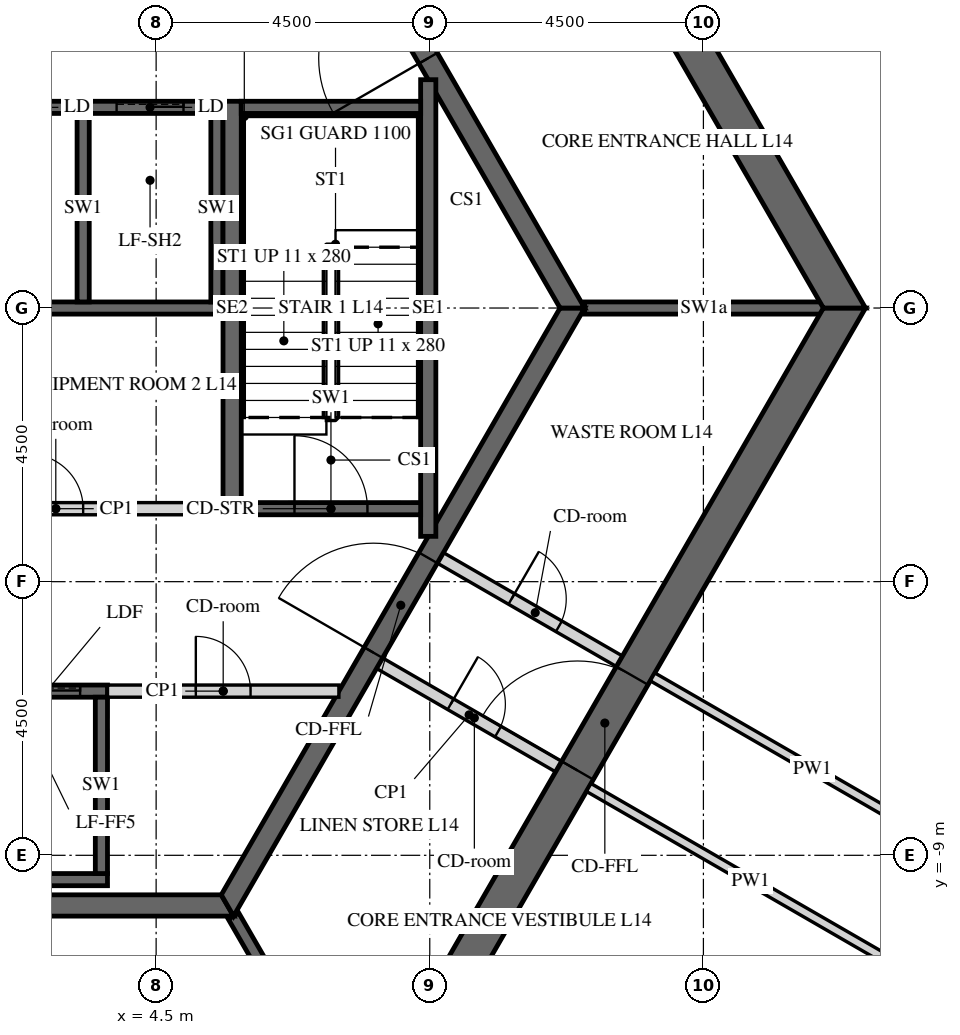
"""IFC4 building model, lengths in metres.
Left out: names, types, materials, properties, quantities, classifications, styles, units other than length and angle.
Written with IfcOpenShell. Run it as: python <this file> out.ifc"""

import sys

from ifc_helpers import new_model, si_unit, direction, frame, frame_2d, origin, place, context, subcontext, project, spatial, polyline, rectangle, outline, extrude, element, fill, save


model = new_model("IFC4")
c1 = context("Model", 3, precision=1e-05, world=origin(), true_north=direction((0.0, 1.0)))
c2 = subcontext(c1, "Body", "Model", "MODEL_VIEW")
j1 = project(units=[si_unit("LENGTHUNIT", "METRE"), si_unit("PLANEANGLEUNIT", "RADIAN")], contexts=[c1])
p1 = place(None, origin())
s1 = spatial("IfcSite", under=j1, at=p1, CompositionType="ELEMENT")
p2 = place(p1, origin())
s2 = spatial("IfcBuilding", under=s1, at=p2, CompositionType="ELEMENT")
p3 = place(p2, frame((0.0, 0.0, 68.7)))
s3 = spatial("IfcBuildingStorey", under=s2, at=p3, CompositionType="ELEMENT", Elevation=68.7)
p4 = place(p3, frame((7.91, -13.7, -0.15), z_axis=(0.0, 0.0, 1.0), x_axis=(0.499999880136, 0.866025472988, 0.0)))
e1 = element("IfcWall", 1, at=p4, inside=s3, PredefinedType="SHEAR", context=c2, shape_type="SweptSolid", body=[
    extrude(outline(polyline([(-0.173, -0.3), (15.993, -0.3), (15.646, 0.3), (0.173, 0.3), (-0.173, -0.3)])), origin(), (0.0, 0.0, 1.0), 3.9),
])
p5 = place(p4, frame((7.039, 0.0, 0.15)))
e2 = element("IfcOpeningElement", 2, at=p5, cuts=e1, PredefinedType="OPENING", context=c2, shape_type="SweptSolid", body=[
    extrude(rectangle(XDim=1.8, YDim=2.4, at=frame_2d((0.9, 1.2))), frame((0.0, 0.31, 0.0), z_axis=(0.0, -1.0, 0.0), x_axis=(1.0, 0.0, 0.0)), (0.0, 0.0, 1.0), 0.62),
])
p6 = place(p3, frame((15.819, 0.0, -0.15), z_axis=(0.0, 0.0, 1.0), x_axis=(-0.499999880136, 0.866025472988, 0.0)))
e3 = element("IfcWall", 3, at=p6, inside=s3, PredefinedType="SHEAR", context=c2, shape_type="SweptSolid", body=[
    extrude(outline(polyline([(-0.173, -0.3), (15.993, -0.3), (15.646, 0.3), (0.173, 0.3), (-0.173, -0.3)])), origin(), (0.0, 0.0, 1.0), 3.9),
])
p7 = place(p6, frame((6.981, 0.0, 0.15)))
e4 = element("IfcOpeningElement", 4, at=p7, cuts=e3, PredefinedType="OPENING", context=c2, shape_type="SweptSolid", body=[
    extrude(rectangle(XDim=1.8, YDim=2.4, at=frame_2d((0.9, 1.2))), frame((0.0, 0.31, 0.0), z_axis=(0.0, -1.0, 0.0), x_axis=(1.0, 0.0, 0.0)), (0.0, 0.0, 1.0), 0.62),
])
p8 = place(p3, frame((-5.673, -9.825, -0.15), z_axis=(0.0, 0.0, 1.0), x_axis=(1.0, 0.0, 0.0)))
e5 = element("IfcWall", 5, at=p8, inside=s3, PredefinedType="SHEAR", context=c2, shape_type="SweptSolid", body=[
    extrude(outline(polyline([(-0.101, -0.175), (11.446, -0.175), (11.244, 0.175), (0.101, 0.175), (-0.101, -0.175)])), origin(), (0.0, 0.0, 1.0), 3.9),
])
p9 = place(p3, frame((5.673, -9.825, -0.15), z_axis=(0.0, 0.0, 1.0), x_axis=(0.499995046907, 0.866028263435, 0.0)))
e6 = element("IfcWall", 6, at=p9, inside=s3, PredefinedType="SHEAR", context=c2, shape_type="SweptSolid", body=[
    extrude(outline(polyline([(-0.101, -0.175), (11.446, -0.175), (11.244, 0.175), (0.101, 0.175), (-0.101, -0.175)])), origin(), (0.0, 0.0, 1.0), 3.9),
])
p10 = place(p9, frame((4.801, 0.0, 0.15)))
e7 = element("IfcOpeningElement", 7, at=p10, cuts=e6, PredefinedType="OPENING", context=c2, shape_type="SweptSolid", body=[
    extrude(rectangle(XDim=1.8, YDim=2.4, at=frame_2d((0.9, 1.2))), frame((0.0, 0.185, 0.0), z_axis=(0.0, -1.0, 0.0), x_axis=(1.0, 0.0, 0.0)), (0.0, 0.0, 1.0), 0.37),
])
p11 = place(p3, frame((11.345, 0.0, -0.15), z_axis=(0.0, 0.0, 1.0), x_axis=(-0.499995046907, 0.866028263435, 0.0)))
e8 = element("IfcWall", 8, at=p11, inside=s3, PredefinedType="SHEAR", context=c2, shape_type="SweptSolid", body=[
    extrude(outline(polyline([(-0.101, -0.175), (11.446, -0.175), (11.244, 0.175), (0.101, 0.175), (-0.101, -0.175)])), origin(), (0.0, 0.0, 1.0), 3.9),
])
p12 = place(p11, frame((4.744, 0.0, 0.15)))
e9 = element("IfcOpeningElement", 9, at=p12, cuts=e8, PredefinedType="OPENING", context=c2, shape_type="SweptSolid", body=[
    extrude(rectangle(XDim=1.8, YDim=2.4, at=frame_2d((0.9, 1.2))), frame((0.0, 0.185, 0.0), z_axis=(0.0, -1.0, 0.0), x_axis=(1.0, 0.0, 0.0)), (0.0, 0.0, 1.0), 0.37),
])
p13 = place(p3, frame((-5.6, 3.3, -0.25), z_axis=(0.0, 0.0, 1.0), x_axis=(1.0, 0.0, 0.0)))
e10 = element("IfcWall", 10, at=p13, inside=s3, PredefinedType="SHEAR", context=c2, shape_type="SweptSolid", body=[
    extrude(rectangle(XDim=11.2, YDim=0.2, at=frame_2d((5.6, 0.0))), origin(), (0.0, 0.0, 1.0), 3.9),
])
p14 = place(p13, frame((0.65, 0.0, 0.25)))
e11 = element("IfcOpeningElement", 11, at=p14, cuts=e10, PredefinedType="OPENING", context=c2, shape_type="SweptSolid", body=[
    extrude(rectangle(XDim=1.1, YDim=2.1, at=frame_2d((0.55, 1.05))), frame((0.0, 0.11, 0.0), z_axis=(0.0, -1.0, 0.0), x_axis=(1.0, 0.0, 0.0)), (0.0, 0.0, 1.0), 0.22),
])
p15 = place(p13, frame((2.85, 0.0, 0.25)))
e12 = element("IfcOpeningElement", 12, at=p15, cuts=e10, PredefinedType="OPENING", context=c2, shape_type="SweptSolid", body=[
    extrude(rectangle(XDim=1.1, YDim=2.1, at=frame_2d((0.55, 1.05))), frame((0.0, 0.11, 0.0), z_axis=(0.0, -1.0, 0.0), x_axis=(1.0, 0.0, 0.0)), (0.0, 0.0, 1.0), 0.22),
])
p16 = place(p13, frame((5.05, 0.0, 0.25)))
e13 = element("IfcOpeningElement", 13, at=p16, cuts=e10, PredefinedType="OPENING", context=c2, shape_type="SweptSolid", body=[
    extrude(rectangle(XDim=1.1, YDim=2.1, at=frame_2d((0.55, 1.05))), frame((0.0, 0.11, 0.0), z_axis=(0.0, -1.0, 0.0), x_axis=(1.0, 0.0, 0.0)), (0.0, 0.0, 1.0), 0.22),
])
p17 = place(p13, frame((7.25, 0.0, 0.25)))
e14 = element("IfcOpeningElement", 14, at=p17, cuts=e10, PredefinedType="OPENING", context=c2, shape_type="SweptSolid", body=[
    extrude(rectangle(XDim=1.1, YDim=2.1, at=frame_2d((0.55, 1.05))), frame((0.0, 0.11, 0.0), z_axis=(0.0, -1.0, 0.0), x_axis=(1.0, 0.0, 0.0)), (0.0, 0.0, 1.0), 0.22),
])
p18 = place(p13, frame((9.45, 0.0, 0.25)))
e15 = element("IfcOpeningElement", 15, at=p18, cuts=e10, PredefinedType="OPENING", context=c2, shape_type="SweptSolid", body=[
    extrude(rectangle(XDim=1.1, YDim=2.1, at=frame_2d((0.55, 1.05))), frame((0.0, 0.11, 0.0), z_axis=(0.0, -1.0, 0.0), x_axis=(1.0, 0.0, 0.0)), (0.0, 0.0, 1.0), 0.22),
])
p19 = place(p3, frame((-5.6, 0.0, -0.25), z_axis=(0.0, 0.0, 1.0), x_axis=(1.0, 0.0, 0.0)))
e16 = element("IfcWall", 16, at=p19, inside=s3, PredefinedType="SHEAR", context=c2, shape_type="SweptSolid", body=[
    extrude(rectangle(XDim=11.2, YDim=0.2, at=frame_2d((5.6, 0.0))), origin(), (0.0, 0.0, 1.0), 3.9),
])
for number, where, z_axis, x_axis in (
    (17, (3.3, 0.1, -0.25), (0.0, 0.0, 1.0), (0.0, 1.0, 0.0)),
    (18, (5.5, 0.1, -0.25), (0.0, 0.0, 1.0), (0.0, 1.0, 0.0)),
):
    element("IfcWall", number, at=place(p3, frame(where, z_axis=z_axis, x_axis=x_axis)), inside=s3, PredefinedType="SHEAR", context=c2, shape_type="SweptSolid", body=[
        extrude(rectangle(XDim=3.1, YDim=0.2, at=frame_2d((1.55, 0.0))), origin(), (0.0, 0.0, 1.0), 3.9),
    ])
p20 = place(p3, frame((-5.5, -6.3, -0.25), z_axis=(0.0, 0.0, 1.0), x_axis=(1.0, 0.0, 0.0)))
e19 = element("IfcWall", 19, at=p20, inside=s3, PredefinedType="SHEAR", context=c2, shape_type="SweptSolid", body=[
    extrude(rectangle(XDim=9.2, YDim=0.2, at=frame_2d((4.6, 0.0))), origin(), (0.0, 0.0, 1.0), 3.9),
])
p21 = place(p20, frame((0.45, 0.0, 0.25)))
e20 = element("IfcOpeningElement", 20, at=p21, cuts=e19, PredefinedType="OPENING", context=c2, shape_type="SweptSolid", body=[
    extrude(rectangle(XDim=1.1, YDim=2.1, at=frame_2d((0.55, 1.05))), frame((0.0, 0.11, 0.0), z_axis=(0.0, -1.0, 0.0), x_axis=(1.0, 0.0, 0.0)), (0.0, 0.0, 1.0), 0.22),
])
p22 = place(p20, frame((2.25, 0.0, 0.25)))
e21 = element("IfcOpeningElement", 21, at=p22, cuts=e19, PredefinedType="OPENING", context=c2, shape_type="SweptSolid", body=[
    extrude(rectangle(XDim=1.1, YDim=2.1, at=frame_2d((0.55, 1.05))), frame((0.0, 0.11, 0.0), z_axis=(0.0, -1.0, 0.0), x_axis=(1.0, 0.0, 0.0)), (0.0, 0.0, 1.0), 0.22),
])
p23 = place(p20, frame((4.05, 0.0, 0.25)))
e22 = element("IfcOpeningElement", 22, at=p23, cuts=e19, PredefinedType="OPENING", context=c2, shape_type="SweptSolid", body=[
    extrude(rectangle(XDim=1.1, YDim=2.1, at=frame_2d((0.55, 1.05))), frame((0.0, 0.11, 0.0), z_axis=(0.0, -1.0, 0.0), x_axis=(1.0, 0.0, 0.0)), (0.0, 0.0, 1.0), 0.22),
])
p24 = place(p20, frame((5.85, 0.0, 0.25)))
e23 = element("IfcOpeningElement", 23, at=p24, cuts=e19, PredefinedType="OPENING", context=c2, shape_type="SweptSolid", body=[
    extrude(rectangle(XDim=1.1, YDim=2.1, at=frame_2d((0.55, 1.05))), frame((0.0, 0.11, 0.0), z_axis=(0.0, -1.0, 0.0), x_axis=(1.0, 0.0, 0.0)), (0.0, 0.0, 1.0), 0.22),
])
p25 = place(p20, frame((7.65, 0.0, 0.25)))
e24 = element("IfcOpeningElement", 24, at=p25, cuts=e19, PredefinedType="OPENING", context=c2, shape_type="SweptSolid", body=[
    extrude(rectangle(XDim=1.1, YDim=2.1, at=frame_2d((0.55, 1.05))), frame((0.0, 0.11, 0.0), z_axis=(0.0, -1.0, 0.0), x_axis=(1.0, 0.0, 0.0)), (0.0, 0.0, 1.0), 0.22),
])
p26 = place(p3, frame((-5.5, -9.4, -0.25), z_axis=(0.0, 0.0, 1.0), x_axis=(1.0, 0.0, 0.0)))
e25 = element("IfcWall", 25, at=p26, inside=s3, PredefinedType="SHEAR", context=c2, shape_type="SweptSolid", body=[
    extrude(rectangle(XDim=9.2, YDim=0.2, at=frame_2d((4.6, 0.0))), origin(), (0.0, 0.0, 1.0), 3.9),
])
p27 = place(p3, frame((3.6, -9.3, -0.25), z_axis=(0.0, 0.0, 1.0), x_axis=(0.0, 1.0, 0.0)))
e26 = element("IfcWall", 26, at=p27, inside=s3, PredefinedType="SHEAR", context=c2, shape_type="SweptSolid", body=[
    extrude(rectangle(XDim=2.9, YDim=0.2, at=frame_2d((1.45, 0.0))), origin(), (0.0, 0.0, 1.0), 3.9),
])
p28 = place(p3, frame((0.1, -3.3, 0.0), z_axis=(0.0, 0.0, 1.0), x_axis=(1.0, 0.0, 0.0)))
e27 = element("IfcWall", 27, at=p28, inside=s3, PredefinedType="PARTITIONING", context=c2, shape_type="SweptSolid", body=[
    extrude(rectangle(XDim=5.5, YDim=0.2, at=frame_2d((2.75, 0.0))), origin(), (0.0, 0.0, 1.0), 3.65),
])
p29 = place(p28, frame((2.3, 0.0, 0.0)))
e28 = element("IfcOpeningElement", 28, at=p29, cuts=e27, PredefinedType="OPENING", context=c2, shape_type="SweptSolid", body=[
    extrude(rectangle(XDim=0.9, YDim=2.1, at=frame_2d((0.45, 1.05))), frame((0.0, 0.11, 0.0), z_axis=(0.0, -1.0, 0.0), x_axis=(1.0, 0.0, 0.0)), (0.0, 0.0, 1.0), 0.22),
])
p30 = place(p3, frame((3.7, -6.3, 0.0), z_axis=(0.0, 0.0, 1.0), x_axis=(1.0, 0.0, 0.0)))
e29 = element("IfcWall", 29, at=p30, inside=s3, PredefinedType="PARTITIONING", context=c2, shape_type="SweptSolid", body=[
    extrude(rectangle(XDim=3.806, YDim=0.2, at=frame_2d((1.903, 0.0))), origin(), (0.0, 0.0, 1.0), 3.65),
])
p31 = place(p30, frame((1.453, 0.0, 0.0)))
e30 = element("IfcOpeningElement", 30, at=p31, cuts=e29, PredefinedType="OPENING", context=c2, shape_type="SweptSolid", body=[
    extrude(rectangle(XDim=0.9, YDim=2.1, at=frame_2d((0.45, 1.05))), frame((0.0, 0.11, 0.0), z_axis=(0.0, -1.0, 0.0), x_axis=(1.0, 0.0, 0.0)), (0.0, 0.0, 1.0), 0.22),
])
p32 = place(p3, frame((11.547, 0.0, -0.15), z_axis=(0.0, 0.0, 1.0), x_axis=(1.0, 0.0, 0.0)))
e31 = element("IfcWall", 31, at=p32, inside=s3, PredefinedType="SHEAR", context=c2, shape_type="SweptSolid", body=[
    extrude(rectangle(XDim=3.926, YDim=0.2, at=frame_2d((1.963, 0.0))), origin(), (0.0, 0.0, 1.0), 3.9),
])
p33 = place(p3, frame((5.773, -10.0, -0.15), z_axis=(0.0, 0.0, 1.0), x_axis=(0.500038251005, -0.86600331843, 0.0)))
e32 = element("IfcWall", 32, at=p33, inside=s3, PredefinedType="SHEAR", context=c2, shape_type="SweptSolid", body=[
    extrude(rectangle(XDim=3.926, YDim=0.2, at=frame_2d((1.963, 0.0))), origin(), (0.0, 0.0, 1.0), 3.9),
])
p34 = place(p3, frame((9.175, -4.109, 0.0), z_axis=(0.0, 0.0, 1.0), x_axis=(0.865989465428, -0.500062241894, 0.0)))
e33 = element("IfcWall", 33, at=p34, inside=s3, PredefinedType="PARTITIONING", context=c2, shape_type="SweptSolid", body=[
    extrude(rectangle(XDim=3.4, YDim=0.2, at=frame_2d((1.7, 0.0))), origin(), (0.0, 0.0, 1.0), 3.65),
])
p35 = place(p34, frame((1.351, 0.0, 0.0)))
e34 = element("IfcOpeningElement", 34, at=p35, cuts=e33, PredefinedType="OPENING", context=c2, shape_type="SweptSolid", body=[
    extrude(rectangle(XDim=0.9, YDim=2.1, at=frame_2d((0.45, 1.05))), frame((0.0, 0.11, 0.0), z_axis=(0.0, -1.0, 0.0), x_axis=(1.0, 0.0, 0.0)), (0.0, 0.0, 1.0), 0.22),
])
p36 = place(p3, frame((8.175, -5.841, 0.0), z_axis=(0.0, 0.0, 1.0), x_axis=(0.866020560687, -0.500008388397, 0.0)))
e35 = element("IfcWall", 35, at=p36, inside=s3, PredefinedType="PARTITIONING", context=c2, shape_type="SweptSolid", body=[
    extrude(rectangle(XDim=3.4, YDim=0.2, at=frame_2d((1.7, 0.0))), origin(), (0.0, 0.0, 1.0), 3.65),
])
p37 = place(p36, frame((1.35, 0.0, 0.0)))
e36 = element("IfcOpeningElement", 36, at=p37, cuts=e35, PredefinedType="OPENING", context=c2, shape_type="SweptSolid", body=[
    extrude(rectangle(XDim=0.9, YDim=2.1, at=frame_2d((0.45, 1.05))), frame((0.0, 0.11, 0.0), z_axis=(0.0, -1.0, 0.0), x_axis=(1.0, 0.0, 0.0)), (0.0, 0.0, 1.0), 0.22),
])
p38 = place(p3, frame((5.75, -3.4, -0.25), z_axis=(0.0, 0.0, 1.0), x_axis=(0.0, 1.0, 0.0)))
e37 = element("IfcWall", 37, at=p38, inside=s3, PredefinedType="SHEAR", context=c2, shape_type="SweptSolid", body=[
    extrude(rectangle(XDim=6.8, YDim=0.3, at=frame_2d((3.4, 0.0))), origin(), (0.0, 0.0, 1.0), 3.9),
])
p39 = place(p3, frame((8.975, -3.755, -0.25), z_axis=(0.0, 0.0, 1.0), x_axis=(0.0, 1.0, 0.0)))
e38 = element("IfcWall", 38, at=p39, inside=s3, PredefinedType="SHEAR", context=c2, shape_type="SweptSolid", body=[
    extrude(rectangle(XDim=7.51, YDim=0.25, at=frame_2d((3.755, 0.0))), origin(), (0.0, 0.0, 1.0), 3.9),
])
p40 = place(p3, frame((5.9, 3.3, -0.25), z_axis=(0.0, 0.0, 1.0), x_axis=(1.0, 0.0, 0.0)))
e39 = element("IfcWall", 39, at=p40, inside=s3, PredefinedType="SHEAR", context=c2, shape_type="SweptSolid", body=[
    extrude(rectangle(XDim=2.95, YDim=0.2, at=frame_2d((1.475, 0.0))), origin(), (0.0, 0.0, 1.0), 3.9),
])
p41 = place(p3, frame((5.9, -3.3, -0.25), z_axis=(0.0, 0.0, 1.0), x_axis=(1.0, 0.0, 0.0)))
e40 = element("IfcWall", 40, at=p41, inside=s3, PredefinedType="SHEAR", context=c2, shape_type="SweptSolid", body=[
    extrude(rectangle(XDim=2.95, YDim=0.2, at=frame_2d((1.475, 0.0))), origin(), (0.0, 0.0, 1.0), 3.9),
])
p42 = place(p41, frame((0.875, 0.0, 0.25)))
e41 = element("IfcOpeningElement", 41, at=p42, cuts=e40, PredefinedType="OPENING", context=c2, shape_type="SweptSolid", body=[
    extrude(rectangle(XDim=1.2, YDim=2.4, at=frame_2d((0.6, 1.2))), frame((0.0, 0.11, 0.0), z_axis=(0.0, -1.0, 0.0), x_axis=(1.0, 0.0, 0.0)), (0.0, 0.0, 1.0), 0.22),
])
p43 = place(p3, frame((13.928, -19.775, 0.0), z_axis=(0.0, 0.0, 1.0), x_axis=(0.50000450071, 0.866022805283, 0.0)))
e42 = element("IfcWall", 42, at=p43, inside=s3, PredefinedType="PARTITIONING", context=c2, shape_type="SweptSolid", body=[
    extrude(rectangle(XDim=23.877, YDim=0.15, at=frame_2d((11.938, 0.0))), origin(), (0.0, 0.0, 1.0), 2.988),
])
p44 = place(p43, frame((3.943, 0.0, 0.0)))
e43 = element("IfcOpeningElement", 43, at=p44, cuts=e42, PredefinedType="OPENING", context=c2, shape_type="SweptSolid", body=[
    extrude(rectangle(XDim=1.0, YDim=2.1, at=frame_2d((0.5, 1.05))), frame((0.0, 0.085, 0.0), z_axis=(0.0, -1.0, 0.0), x_axis=(1.0, 0.0, 0.0)), (0.0, 0.0, 1.0), 0.17),
])
p45 = place(p43, frame((14.972, 0.0, 0.0)))
e44 = element("IfcOpeningElement", 44, at=p45, cuts=e42, PredefinedType="OPENING", context=c2, shape_type="SweptSolid", body=[
    extrude(rectangle(XDim=1.0, YDim=2.1, at=frame_2d((0.5, 1.05))), frame((0.0, 0.085, 0.0), z_axis=(0.0, -1.0, 0.0), x_axis=(1.0, 0.0, 0.0)), (0.0, 0.0, 1.0), 0.17),
])
p46 = place(p3, frame((25.821, 0.972, 0.0), z_axis=(0.0, 0.0, 1.0), x_axis=(-0.559193816298, 0.829036956845, 0.0)))
e45 = element("IfcWall", 45, at=p46, inside=s3, PredefinedType="PARTITIONING", context=c2, shape_type="SweptSolid", body=[
    extrude(rectangle(XDim=22.002, YDim=0.15, at=frame_2d((11.001, 0.0))), origin(), (0.0, 0.0, 1.0), 2.988),
])
p47 = place(p46, frame((3.269, 0.0, 0.0)))
e46 = element("IfcOpeningElement", 46, at=p47, cuts=e45, PredefinedType="OPENING", context=c2, shape_type="SweptSolid", body=[
    extrude(rectangle(XDim=1.0, YDim=2.1, at=frame_2d((0.5, 1.05))), frame((0.0, 0.085, 0.0), z_axis=(0.0, -1.0, 0.0), x_axis=(1.0, 0.0, 0.0)), (0.0, 0.0, 1.0), 0.17),
])
p48 = place(p46, frame((13.221, 0.0, 0.0)))
e47 = element("IfcOpeningElement", 47, at=p48, cuts=e45, PredefinedType="OPENING", context=c2, shape_type="SweptSolid", body=[
    extrude(rectangle(XDim=1.0, YDim=2.1, at=frame_2d((0.5, 1.05))), frame((0.0, 0.085, 0.0), z_axis=(0.0, -1.0, 0.0), x_axis=(1.0, 0.0, 0.0)), (0.0, 0.0, 1.0), 0.17),
])
p49 = place(p46, frame((20.852, 0.0, 0.0)))
e48 = element("IfcOpeningElement", 48, at=p49, cuts=e45, PredefinedType="OPENING", context=c2, shape_type="SweptSolid", body=[
    extrude(rectangle(XDim=1.0, YDim=2.1, at=frame_2d((0.5, 1.05))), frame((0.0, 0.085, 0.0), z_axis=(0.0, -1.0, 0.0), x_axis=(1.0, 0.0, 0.0)), (0.0, 0.0, 1.0), 0.17),
])
p50 = place(p3, frame((17.925, -9.103, 0.0), z_axis=(0.0, 0.0, 1.0), x_axis=(-0.866013586754, 0.500020467139, 0.0)))
e49 = element("IfcWall", 49, at=p50, inside=s3, PredefinedType="PARTITIONING", context=c2, shape_type="SweptSolid", body=[
    extrude(rectangle(XDim=6.075, YDim=0.15, at=frame_2d((3.038, 0.0))), origin(), (0.0, 0.0, 1.0), 2.988),
])
p51 = place(p3, frame((11.614, -7.884, 0.0), z_axis=(0.0, 0.0, 1.0), x_axis=(0.866033542371, -0.499985903289, 0.0)))
e50 = element("IfcWall", 50, at=p51, inside=s3, PredefinedType="PARTITIONING", context=c2, shape_type="SweptSolid", body=[
    extrude(rectangle(XDim=6.15, YDim=0.15, at=frame_2d((3.075, 0.0))), origin(), (0.0, 0.0, 1.0), 2.988),
])
p52 = place(p5, origin())
e51 = element("IfcDoor", 51, at=p52, inside=s3, OperationType="DOUBLE_DOOR_SINGLE_SWING", PredefinedType="DOOR", context=c2, shape_type="SweptSolid", body=[
    extrude(rectangle(XDim=1.8, YDim=2.4, at=frame_2d((0.9, 1.2))), frame((0.0, 0.025, 0.0), z_axis=(0.0, -1.0, 0.0), x_axis=(1.0, 0.0, 0.0)), (0.0, 0.0, 1.0), 0.05),
])
fill(e2, e51)
p53 = place(p12, origin())
e52 = element("IfcDoor", 52, at=p53, inside=s3, OperationType="DOUBLE_DOOR_SINGLE_SWING", PredefinedType="DOOR", context=c2, shape_type="SweptSolid", body=[
    extrude(rectangle(XDim=1.8, YDim=2.4, at=frame_2d((0.9, 1.2))), frame((0.0, 0.025, 0.0), z_axis=(0.0, -1.0, 0.0), x_axis=(1.0, 0.0, 0.0)), (0.0, 0.0, 1.0), 0.05),
])
fill(e9, e52)
p54 = place(p10, origin())
e53 = element("IfcDoor", 53, at=p54, inside=s3, OperationType="DOUBLE_DOOR_SINGLE_SWING", PredefinedType="DOOR", context=c2, shape_type="SweptSolid", body=[
    extrude(rectangle(XDim=1.8, YDim=2.4, at=frame_2d((0.9, 1.2))), frame((0.0, 0.025, 0.0), z_axis=(0.0, -1.0, 0.0), x_axis=(1.0, 0.0, 0.0)), (0.0, 0.0, 1.0), 0.05),
])
fill(e7, e53)
p55 = place(p29, origin())
e54 = element("IfcDoor", 54, at=p55, inside=s3, OperationType="SINGLE_SWING_LEFT", PredefinedType="DOOR", context=c2, shape_type="SweptSolid", body=[
    extrude(rectangle(XDim=0.9, YDim=2.1, at=frame_2d((0.45, 1.05))), frame((0.0, 0.025, 0.0), z_axis=(0.0, -1.0, 0.0), x_axis=(1.0, 0.0, 0.0)), (0.0, 0.0, 1.0), 0.05),
])
fill(e28, e54)
p56 = place(p31, origin())
e55 = element("IfcDoor", 55, at=p56, inside=s3, OperationType="SINGLE_SWING_LEFT", PredefinedType="DOOR", context=c2, shape_type="SweptSolid", body=[
    extrude(rectangle(XDim=0.9, YDim=2.1, at=frame_2d((0.45, 1.05))), frame((0.0, 0.025, 0.0), z_axis=(0.0, -1.0, 0.0), x_axis=(1.0, 0.0, 0.0)), (0.0, 0.0, 1.0), 0.05),
])
fill(e30, e55)
p57 = place(p35, origin())
e56 = element("IfcDoor", 56, at=p57, inside=s3, OperationType="SINGLE_SWING_LEFT", PredefinedType="DOOR", context=c2, shape_type="SweptSolid", body=[
    extrude(rectangle(XDim=0.9, YDim=2.1, at=frame_2d((0.45, 1.05))), frame((0.0, 0.025, 0.0), z_axis=(0.0, -1.0, 0.0), x_axis=(1.0, 0.0, 0.0)), (0.0, 0.0, 1.0), 0.05),
])
fill(e34, e56)
p58 = place(p37, origin())
e57 = element("IfcDoor", 57, at=p58, inside=s3, OperationType="SINGLE_SWING_LEFT", PredefinedType="DOOR", context=c2, shape_type="SweptSolid", body=[
    extrude(rectangle(XDim=0.9, YDim=2.1, at=frame_2d((0.45, 1.05))), frame((0.0, 0.025, 0.0), z_axis=(0.0, -1.0, 0.0), x_axis=(1.0, 0.0, 0.0)), (0.0, 0.0, 1.0), 0.05),
])
fill(e36, e57)
p59 = place(p42, origin())
e58 = element("IfcDoor", 58, at=p59, inside=s3, OperationType="SINGLE_SWING_LEFT", PredefinedType="DOOR", context=c2, shape_type="SweptSolid", body=[
    extrude(rectangle(XDim=1.2, YDim=2.4, at=frame_2d((0.6, 1.2))), frame((0.0, 0.025, 0.0), z_axis=(0.0, -1.0, 0.0), x_axis=(1.0, 0.0, 0.0)), (0.0, 0.0, 1.0), 0.05),
])
fill(e41, e58)
p60 = place(p18, origin())
e59 = element("IfcDoor", 59, at=p60, inside=s3, OperationType="SLIDING_TO_LEFT", PredefinedType="DOOR", context=c2, shape_type="SweptSolid", body=[
    extrude(rectangle(XDim=1.1, YDim=2.1, at=frame_2d((0.55, 1.05))), frame((0.0, 0.025, 0.0), z_axis=(0.0, -1.0, 0.0), x_axis=(1.0, 0.0, 0.0)), (0.0, 0.0, 1.0), 0.05),
])
fill(e15, e59)
p61 = place(p25, origin())
e60 = element("IfcDoor", 60, at=p61, inside=s3, OperationType="SLIDING_TO_LEFT", PredefinedType="DOOR", context=c2, shape_type="SweptSolid", body=[
    extrude(rectangle(XDim=1.1, YDim=2.1, at=frame_2d((0.55, 1.05))), frame((0.0, 0.025, 0.0), z_axis=(0.0, -1.0, 0.0), x_axis=(1.0, 0.0, 0.0)), (0.0, 0.0, 1.0), 0.05),
])
fill(e24, e60)
save(model, sys.argv[1])
